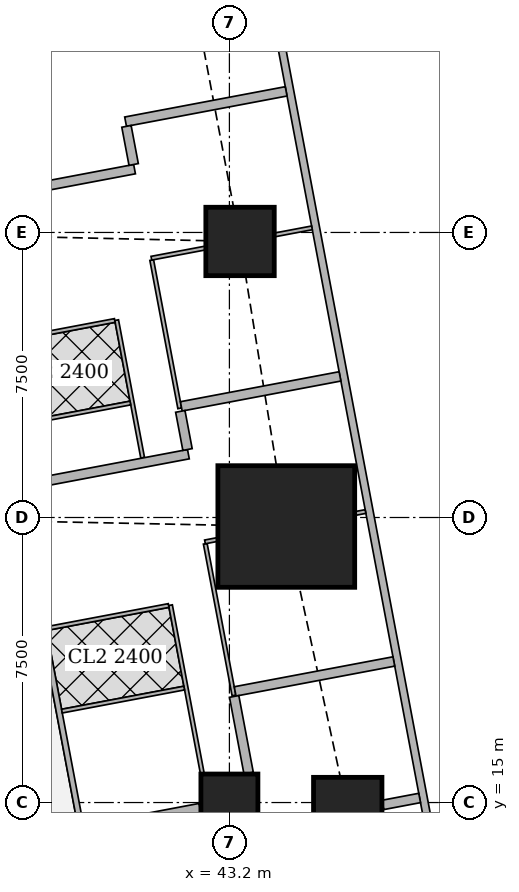
"""IFC4 building model, lengths in metres.
Left out: names, types, materials, properties, quantities, classifications, styles, units other than length and angle.
Written with IfcOpenShell. Run it as: python <this file> out.ifc"""

import sys

from ifc_helpers import new_model, si_unit, direction, frame, frame_2d, origin, origin_2d, place, context, subcontext, project, spatial, rectangle, extrude, element, fill, save


model = new_model("IFC4")
c1 = context("Model", 3, precision=1e-05, world=origin(), true_north=direction((0.0, 1.0)))
c2 = subcontext(c1, "Body", "Model", "MODEL_VIEW")
j1 = project(units=[si_unit("LENGTHUNIT", "METRE"), si_unit("PLANEANGLEUNIT", "RADIAN")], contexts=[c1])
p1 = place(None, origin())
s1 = spatial("IfcSite", under=j1, at=p1, CompositionType="ELEMENT")
p2 = place(p1, origin())
s2 = spatial("IfcBuilding", under=s1, at=p2, CompositionType="ELEMENT")
p3 = place(p2, frame((0.0, 0.0, 169.55)))
s3 = spatial("IfcBuildingStorey", under=s2, at=p3, CompositionType="ELEMENT", Elevation=169.55)
p4 = place(p3, frame((43.2, 15.0, 0.0), z_axis=(0.0, 0.0, 1.0), x_axis=(1.0, 0.0, 0.0)))
e1 = element("IfcColumn", 1, at=p4, inside=s3, PredefinedType="COLUMN", context=c2, shape_type="SweptSolid", body=[
    extrude(rectangle(XDim=1.5, YDim=1.5, at=origin_2d()), origin(), (0.0, 0.0, 1.0), 3.75),
])
p5 = place(p3, frame((46.314, 14.763, 0.0), z_axis=(0.0, 0.0, 1.0), x_axis=(1.0, 0.0, 0.0)))
e2 = element("IfcColumn", 2, at=p5, inside=s3, PredefinedType="COLUMN", context=c2, shape_type="SweptSolid", body=[
    extrude(rectangle(XDim=1.8, YDim=1.8, at=origin_2d()), origin(), (0.0, 0.0, 1.0), 3.75),
])
p6 = place(p3, frame((44.697, 22.263, 0.0), z_axis=(0.0, 0.0, 1.0), x_axis=(1.0, 0.0, 0.0)))
e3 = element("IfcColumn", 3, at=p6, inside=s3, PredefinedType="COLUMN", context=c2, shape_type="SweptSolid", body=[
    extrude(rectangle(XDim=3.6, YDim=3.2, at=origin_2d()), origin(), (0.0, 0.0, 1.0), 3.75),
])
p7 = place(p3, frame((43.48, 29.763, 0.0), z_axis=(0.0, 0.0, 1.0), x_axis=(1.0, 0.0, 0.0)))
e4 = element("IfcColumn", 4, at=p7, inside=s3, PredefinedType="COLUMN", context=c2, shape_type="SweptSolid", body=[
    extrude(rectangle(XDim=1.8, YDim=1.8, at=origin_2d()), origin(), (0.0, 0.0, 1.0), 3.75),
])
p8 = place(p3, frame((50.653, 2.703, 0.0), z_axis=(0.0, 0.0, 1.0), x_axis=(-0.185612026696, 0.982623109613, 0.0)))
e5 = element("IfcWall", 5, at=p8, inside=s3, PredefinedType="SOLIDWALL", context=c2, shape_type="SweptSolid", body=[
    extrude(rectangle(XDim=41.393, YDim=0.2, at=frame_2d((20.697, 0.0))), origin(), (0.0, 0.0, 1.0), 3.5),
])
p9 = place(p8, frame((1.633, 0.0, 0.9)))
e6 = element("IfcOpeningElement", 6, at=p9, cuts=e5, PredefinedType="OPENING", context=c2, shape_type="SweptSolid", body=[
    extrude(rectangle(XDim=1.8, YDim=1.5, at=frame_2d((0.9, 0.75))), frame((0.0, 0.11, 0.0), z_axis=(0.0, -1.0, 0.0), x_axis=(1.0, 0.0, 0.0)), (0.0, 0.0, 1.0), 0.22),
])
p10 = place(p8, frame((6.032, 0.0, 0.9)))
e7 = element("IfcOpeningElement", 7, at=p10, cuts=e5, PredefinedType="OPENING", context=c2, shape_type="SweptSolid", body=[
    extrude(rectangle(XDim=1.8, YDim=1.5, at=frame_2d((0.9, 0.75))), frame((0.0, 0.11, 0.0), z_axis=(0.0, -1.0, 0.0), x_axis=(1.0, 0.0, 0.0)), (0.0, 0.0, 1.0), 0.22),
])
p11 = place(p8, frame((9.848, 0.0, 0.9)))
e8 = element("IfcOpeningElement", 8, at=p11, cuts=e5, PredefinedType="OPENING", context=c2, shape_type="SweptSolid", body=[
    extrude(rectangle(XDim=1.8, YDim=1.5, at=frame_2d((0.9, 0.75))), frame((0.0, 0.11, 0.0), z_axis=(0.0, -1.0, 0.0), x_axis=(1.0, 0.0, 0.0)), (0.0, 0.0, 1.0), 0.22),
])
p12 = place(p8, frame((13.664, 0.0, 0.9)))
e9 = element("IfcOpeningElement", 9, at=p12, cuts=e5, PredefinedType="OPENING", context=c2, shape_type="SweptSolid", body=[
    extrude(rectangle(XDim=1.8, YDim=1.5, at=frame_2d((0.9, 0.75))), frame((0.0, 0.11, 0.0), z_axis=(0.0, -1.0, 0.0), x_axis=(1.0, 0.0, 0.0)), (0.0, 0.0, 1.0), 0.22),
])
p13 = place(p8, frame((17.481, 0.0, 0.9)))
e10 = element("IfcOpeningElement", 10, at=p13, cuts=e5, PredefinedType="OPENING", context=c2, shape_type="SweptSolid", body=[
    extrude(rectangle(XDim=1.8, YDim=1.5, at=frame_2d((0.9, 0.75))), frame((0.0, 0.11, 0.0), z_axis=(0.0, -1.0, 0.0), x_axis=(1.0, 0.0, 0.0)), (0.0, 0.0, 1.0), 0.22),
])
p14 = place(p8, frame((21.297, 0.0, 0.9)))
e11 = element("IfcOpeningElement", 11, at=p14, cuts=e5, PredefinedType="OPENING", context=c2, shape_type="SweptSolid", body=[
    extrude(rectangle(XDim=1.8, YDim=1.5, at=frame_2d((0.9, 0.75))), frame((0.0, 0.11, 0.0), z_axis=(0.0, -1.0, 0.0), x_axis=(1.0, 0.0, 0.0)), (0.0, 0.0, 1.0), 0.22),
])
p15 = place(p8, frame((25.113, 0.0, 0.9)))
e12 = element("IfcOpeningElement", 12, at=p15, cuts=e5, PredefinedType="OPENING", context=c2, shape_type="SweptSolid", body=[
    extrude(rectangle(XDim=1.8, YDim=1.5, at=frame_2d((0.9, 0.75))), frame((0.0, 0.11, 0.0), z_axis=(0.0, -1.0, 0.0), x_axis=(1.0, 0.0, 0.0)), (0.0, 0.0, 1.0), 0.22),
])
p16 = place(p8, frame((28.93, 0.0, 0.9)))
e13 = element("IfcOpeningElement", 13, at=p16, cuts=e5, PredefinedType="OPENING", context=c2, shape_type="SweptSolid", body=[
    extrude(rectangle(XDim=1.8, YDim=1.5, at=frame_2d((0.9, 0.75))), frame((0.0, 0.11, 0.0), z_axis=(0.0, -1.0, 0.0), x_axis=(1.0, 0.0, 0.0)), (0.0, 0.0, 1.0), 0.22),
])
p17 = place(p8, frame((32.746, 0.0, 0.9)))
e14 = element("IfcOpeningElement", 14, at=p17, cuts=e5, PredefinedType="OPENING", context=c2, shape_type="SweptSolid", body=[
    extrude(rectangle(XDim=1.8, YDim=1.5, at=frame_2d((0.9, 0.75))), frame((0.0, 0.11, 0.0), z_axis=(0.0, -1.0, 0.0), x_axis=(1.0, 0.0, 0.0)), (0.0, 0.0, 1.0), 0.22),
])
p18 = place(p8, frame((36.481, 0.0, 0.9)))
e15 = element("IfcOpeningElement", 15, at=p18, cuts=e5, PredefinedType="OPENING", context=c2, shape_type="SweptSolid", body=[
    extrude(rectangle(XDim=1.8, YDim=1.5, at=frame_2d((0.9, 0.75))), frame((0.0, 0.11, 0.0), z_axis=(0.0, -1.0, 0.0), x_axis=(1.0, 0.0, 0.0)), (0.0, 0.0, 1.0), 0.22),
])
p19 = place(p3, frame((33.877, 43.029, 0.0), z_axis=(0.0, 0.0, 1.0), x_axis=(0.185596841028, -0.98262597798, 0.0)))
e16 = element("IfcWall", 16, at=p19, inside=s3, PredefinedType="SOLIDWALL", context=c2, shape_type="SweptSolid", body=[
    extrude(rectangle(XDim=41.66, YDim=0.15, at=frame_2d((20.83, 0.0))), origin(), (0.0, 0.0, 1.0), 2.5),
])
p20 = place(p19, frame((8.63, 0.0, 0.0)))
e17 = element("IfcOpeningElement", 17, at=p20, cuts=e16, PredefinedType="OPENING", context=c2, shape_type="SweptSolid", body=[
    extrude(rectangle(XDim=1.0, YDim=2.1, at=frame_2d((0.5, 1.05))), frame((0.0, 0.085, 0.0), z_axis=(0.0, -1.0, 0.0), x_axis=(1.0, 0.0, 0.0)), (0.0, 0.0, 1.0), 0.17),
])
p21 = place(p19, frame((13.841, 0.0, 0.0)))
e18 = element("IfcOpeningElement", 18, at=p21, cuts=e16, PredefinedType="OPENING", context=c2, shape_type="SweptSolid", body=[
    extrude(rectangle(XDim=1.0, YDim=2.1, at=frame_2d((0.5, 1.05))), frame((0.0, 0.085, 0.0), z_axis=(0.0, -1.0, 0.0), x_axis=(1.0, 0.0, 0.0)), (0.0, 0.0, 1.0), 0.17),
])
p22 = place(p19, frame((21.474, 0.0, 0.0)))
e19 = element("IfcOpeningElement", 19, at=p22, cuts=e16, PredefinedType="OPENING", context=c2, shape_type="SweptSolid", body=[
    extrude(rectangle(XDim=1.0, YDim=2.1, at=frame_2d((0.5, 1.05))), frame((0.0, 0.085, 0.0), z_axis=(0.0, -1.0, 0.0), x_axis=(1.0, 0.0, 0.0)), (0.0, 0.0, 1.0), 0.17),
])
p23 = place(p19, frame((30.4, 0.0, 0.0)))
e20 = element("IfcOpeningElement", 20, at=p23, cuts=e16, PredefinedType="OPENING", context=c2, shape_type="SweptSolid", body=[
    extrude(rectangle(XDim=1.0, YDim=2.1, at=frame_2d((0.5, 1.05))), frame((0.0, 0.085, 0.0), z_axis=(0.0, -1.0, 0.0), x_axis=(1.0, 0.0, 0.0)), (0.0, 0.0, 1.0), 0.17),
])
p24 = place(p19, frame((32.288, 0.0, 0.0)))
e21 = element("IfcOpeningElement", 21, at=p24, cuts=e16, PredefinedType="OPENING", context=c2, shape_type="SweptSolid", body=[
    extrude(rectangle(XDim=1.0, YDim=2.1, at=frame_2d((0.5, 1.05))), frame((0.0, 0.085, 0.0), z_axis=(0.0, -1.0, 0.0), x_axis=(1.0, 0.0, 0.0)), (0.0, 0.0, 1.0), 0.17),
])
p25 = place(p3, frame((41.156, 29.273, 0.0), z_axis=(0.0, 0.0, 1.0), x_axis=(0.185662195158, -0.982613631744, 0.0)))
e22 = element("IfcWall", 22, at=p25, inside=s3, PredefinedType="PARTITIONING", context=c2, shape_type="SweptSolid", body=[
    extrude(rectangle(XDim=3.97, YDim=0.1, at=frame_2d((1.985, 0.0))), origin(), (0.0, 0.0, 1.0), 2.5),
])
p26 = place(p25, frame((1.581, 0.0, 0.0)))
e23 = element("IfcOpeningElement", 23, at=p26, cuts=e22, PredefinedType="OPENING", context=c2, shape_type="SweptSolid", body=[
    extrude(rectangle(XDim=0.9, YDim=2.1, at=frame_2d((0.45, 1.05))), frame((0.0, 0.06, 0.0), z_axis=(0.0, -1.0, 0.0), x_axis=(1.0, 0.0, 0.0)), (0.0, 0.0, 1.0), 0.12),
])
p27 = place(p3, frame((40.233, 27.693, 0.0), z_axis=(0.0, 0.0, 1.0), x_axis=(0.185632361754, -0.982619268216, 0.0)))
e24 = element("IfcWall", 24, at=p27, inside=s3, PredefinedType="PARTITIONING", context=c2, shape_type="SweptSolid", body=[
    extrude(rectangle(XDim=3.685, YDim=0.1, at=frame_2d((1.843, 0.0))), origin(), (0.0, 0.0, 1.0), 3.5),
])
p28 = place(p27, frame((0.655, 0.0, 0.0)))
e25 = element("IfcOpeningElement", 25, at=p28, cuts=e24, PredefinedType="OPENING", context=c2, shape_type="SweptSolid", body=[
    extrude(rectangle(XDim=0.9, YDim=2.1, at=frame_2d((0.45, 1.05))), frame((0.0, 0.06, 0.0), z_axis=(0.0, -1.0, 0.0), x_axis=(1.0, 0.0, 0.0)), (0.0, 0.0, 1.0), 0.12),
])
p29 = place(p27, frame((2.563, 0.0, 0.0)))
e26 = element("IfcOpeningElement", 26, at=p29, cuts=e24, PredefinedType="OPENING", context=c2, shape_type="SweptSolid", body=[
    extrude(rectangle(XDim=0.9, YDim=2.1, at=frame_2d((0.45, 1.05))), frame((0.0, 0.06, 0.0), z_axis=(0.0, -1.0, 0.0), x_axis=(1.0, 0.0, 0.0)), (0.0, 0.0, 1.0), 0.12),
])
p30 = place(p3, frame((45.372, 30.121, 0.0), z_axis=(0.0, 0.0, 1.0), x_axis=(-0.982530437059, -0.186101961978, 0.0)))
e27 = element("IfcWall", 27, at=p30, inside=s3, PredefinedType="PARTITIONING", context=c2, shape_type="SweptSolid", body=[
    extrude(rectangle(XDim=1.0, YDim=0.1, at=frame_2d((0.5, 0.0))), origin(), (0.0, 0.0, 1.0), 3.5),
])
p31 = place(p3, frame((42.57, 29.591, 0.0), z_axis=(0.0, 0.0, 1.0), x_axis=(-0.98259436979, -0.185764109712, 0.0)))
e28 = element("IfcWall", 28, at=p31, inside=s3, PredefinedType="PARTITIONING", context=c2, shape_type="SweptSolid", body=[
    extrude(rectangle(XDim=1.448, YDim=0.1, at=frame_2d((0.724, 0.0))), origin(), (0.0, 0.0, 1.0), 2.5),
])
for number, where, z_axis, x_axis in (
    (29, (40.184, 27.684, 0.0), (0.0, 0.0, 1.0), (-0.983, -0.186, 0.0)),
    (30, (40.594, 25.512, 0.0), (0.0, 0.0, 1.0), (-0.983, -0.186, 0.0)),
):
    element("IfcWall", number, at=place(p3, frame(where, z_axis=z_axis, x_axis=x_axis)), inside=s3, PredefinedType="PARTITIONING", context=c2, shape_type="SweptSolid", body=[
        extrude(rectangle(XDim=3.274, YDim=0.1, at=frame_2d((1.637, 0.0))), origin(), (0.0, 0.0, 1.0), 3.5),
    ])
p32 = place(p3, frame((44.693, 33.713, 0.0), z_axis=(0.0, 0.0, 1.0), x_axis=(-0.982633535512, -0.185556823879, 0.0)))
e31 = element("IfcWall", 31, at=p32, inside=s3, PredefinedType="SOLIDWALL", context=c2, shape_type="SweptSolid", body=[
    extrude(rectangle(XDim=4.3, YDim=0.25, at=frame_2d((2.15, 0.0))), origin(), (0.0, 0.0, 1.0), 2.1),
])
p33 = place(p3, frame((40.704, 31.666, 0.0), z_axis=(0.0, 0.0, 1.0), x_axis=(-0.982612837616, -0.185666398014, 0.0)))
e32 = element("IfcWall", 32, at=p33, inside=s3, PredefinedType="SOLIDWALL", context=c2, shape_type="SweptSolid", body=[
    extrude(rectangle(XDim=4.525, YDim=0.25, at=frame_2d((2.262, 0.0))), origin(), (0.0, 0.0, 1.0), 3.5),
])
p34 = place(p3, frame((40.491, 32.792, 0.0), z_axis=(0.0, 0.0, 1.0), x_axis=(0.18607888991, -0.982534806879, 0.0)))
e33 = element("IfcWall", 33, at=p34, inside=s3, PredefinedType="SOLIDWALL", context=c2, shape_type="SweptSolid", body=[
    extrude(rectangle(XDim=1.021, YDim=0.25, at=frame_2d((0.51, 0.0))), origin(), (0.0, 0.0, 1.0), 3.5),
])
p35 = place(p3, frame((42.565, 21.809, 0.0), z_axis=(0.0, 0.0, 1.0), x_axis=(0.185910488551, -0.982566684885, 0.0)))
e34 = element("IfcWall", 34, at=p35, inside=s3, PredefinedType="PARTITIONING", context=c2, shape_type="SweptSolid", body=[
    extrude(rectangle(XDim=4.062, YDim=0.1, at=frame_2d((2.031, 0.0))), origin(), (0.0, 0.0, 1.0), 2.5),
])
p36 = place(p35, frame((1.618, 0.0, 0.0)))
e35 = element("IfcOpeningElement", 35, at=p36, cuts=e34, PredefinedType="OPENING", context=c2, shape_type="SweptSolid", body=[
    extrude(rectangle(XDim=0.9, YDim=2.1, at=frame_2d((0.45, 1.05))), frame((0.0, 0.06, 0.0), z_axis=(0.0, -1.0, 0.0), x_axis=(1.0, 0.0, 0.0)), (0.0, 0.0, 1.0), 0.12),
])
p37 = place(p3, frame((41.65, 20.193, 0.0), z_axis=(0.0, 0.0, 1.0), x_axis=(0.185692658583, -0.982607875273, 0.0)))
e36 = element("IfcWall", 36, at=p37, inside=s3, PredefinedType="PARTITIONING", context=c2, shape_type="SweptSolid", body=[
    extrude(rectangle(XDim=4.514, YDim=0.1, at=frame_2d((2.257, 0.0))), origin(), (0.0, 0.0, 1.0), 3.5),
])
p38 = place(p37, frame((0.655, 0.0, 0.0)))
e37 = element("IfcOpeningElement", 37, at=p38, cuts=e36, PredefinedType="OPENING", context=c2, shape_type="SweptSolid", body=[
    extrude(rectangle(XDim=0.9, YDim=2.1, at=frame_2d((0.45, 1.05))), frame((0.0, 0.06, 0.0), z_axis=(0.0, -1.0, 0.0), x_axis=(1.0, 0.0, 0.0)), (0.0, 0.0, 1.0), 0.12),
])
p39 = place(p37, frame((3.35, 0.0, 0.0)))
e38 = element("IfcOpeningElement", 38, at=p39, cuts=e36, PredefinedType="OPENING", context=c2, shape_type="SweptSolid", body=[
    extrude(rectangle(XDim=0.9, YDim=2.1, at=frame_2d((0.45, 1.05))), frame((0.0, 0.06, 0.0), z_axis=(0.0, -1.0, 0.0), x_axis=(1.0, 0.0, 0.0)), (0.0, 0.0, 1.0), 0.12),
])
p40 = place(p3, frame((46.782, 22.657, 0.0), z_axis=(0.0, 0.0, 1.0), x_axis=(-0.982574553168, -0.185868898601, 0.0)))
e39 = element("IfcWall", 39, at=p40, inside=s3, PredefinedType="PARTITIONING", context=c2, shape_type="SweptSolid", body=[
    extrude(rectangle(XDim=0.28, YDim=0.1, at=frame_2d((0.14, 0.0))), origin(), (0.0, 0.0, 1.0), 3.5),
])
p41 = place(p3, frame((42.887, 21.921, 0.0), z_axis=(0.0, 0.0, 1.0), x_axis=(-0.982274918032, -0.187445953293, 0.0)))
e40 = element("IfcWall", 40, at=p41, inside=s3, PredefinedType="PARTITIONING", context=c2, shape_type="SweptSolid", body=[
    extrude(rectangle(XDim=0.336, YDim=0.1, at=frame_2d((0.168, 0.0))), origin(), (0.0, 0.0, 1.0), 2.5),
])
p42 = place(p3, frame((41.601, 20.184, 0.0), z_axis=(0.0, 0.0, 1.0), x_axis=(-0.982607026909, -0.185697147715, 0.0)))
e41 = element("IfcWall", 41, at=p42, inside=s3, PredefinedType="PARTITIONING", context=c2, shape_type="SweptSolid", body=[
    extrude(rectangle(XDim=3.275, YDim=0.1, at=frame_2d((1.637, 0.0))), origin(), (0.0, 0.0, 1.0), 3.5),
])
p43 = place(p3, frame((42.011, 18.012, 0.0), z_axis=(0.0, 0.0, 1.0), x_axis=(-0.982674977865, -0.185337227447, 0.0)))
e42 = element("IfcWall", 42, at=p43, inside=s3, PredefinedType="PARTITIONING", context=c2, shape_type="SweptSolid", body=[
    extrude(rectangle(XDim=3.275, YDim=0.1, at=frame_2d((1.637, 0.0))), origin(), (0.0, 0.0, 1.0), 3.5),
])
p44 = place(p3, frame((46.11, 26.213, 0.0), z_axis=(0.0, 0.0, 1.0), x_axis=(-0.982623519589, -0.185609856287, 0.0)))
e43 = element("IfcWall", 43, at=p44, inside=s3, PredefinedType="SOLIDWALL", context=c2, shape_type="SweptSolid", body=[
    extrude(rectangle(XDim=4.25, YDim=0.25, at=frame_2d((2.125, 0.0))), origin(), (0.0, 0.0, 1.0), 2.1),
])
p45 = place(p3, frame((42.121, 24.166, 0.0), z_axis=(0.0, 0.0, 1.0), x_axis=(-0.982612837616, -0.185666398014, 0.0)))
e44 = element("IfcWall", 44, at=p45, inside=s3, PredefinedType="SOLIDWALL", context=c2, shape_type="SweptSolid", body=[
    extrude(rectangle(XDim=4.525, YDim=0.25, at=frame_2d((2.262, 0.0))), origin(), (0.0, 0.0, 1.0), 3.5),
])
p46 = place(p3, frame((41.908, 25.292, 0.0), z_axis=(0.0, 0.0, 1.0), x_axis=(0.18607888991, -0.982534806879, 0.0)))
e45 = element("IfcWall", 45, at=p46, inside=s3, PredefinedType="SOLIDWALL", context=c2, shape_type="SweptSolid", body=[
    extrude(rectangle(XDim=1.021, YDim=0.25, at=frame_2d((0.51, 0.0))), origin(), (0.0, 0.0, 1.0), 3.5),
])
p47 = place(p3, frame((47.527, 18.712, 0.0), z_axis=(0.0, 0.0, 1.0), x_axis=(-0.982665405803, -0.185387972203, 0.0)))
e46 = element("IfcWall", 46, at=p47, inside=s3, PredefinedType="SOLIDWALL", context=c2, shape_type="SweptSolid", body=[
    extrude(rectangle(XDim=4.25, YDim=0.25, at=frame_2d((2.125, 0.0))), origin(), (0.0, 0.0, 1.0), 2.1),
])
p48 = place(p3, frame((42.426, 14.854, 0.0), z_axis=(0.0, 0.0, 1.0), x_axis=(-0.982603320446, -0.185716759201, 0.0)))
e47 = element("IfcWall", 47, at=p48, inside=s3, PredefinedType="SOLIDWALL", context=c2, shape_type="SweptSolid", body=[
    extrude(rectangle(XDim=3.096, YDim=0.25, at=frame_2d((1.548, 0.0))), origin(), (0.0, 0.0, 1.0), 3.5),
])
p49 = place(p3, frame((43.325, 17.792, 0.0), z_axis=(0.0, 0.0, 1.0), x_axis=(0.185565963553, -0.982631809566, 0.0)))
e48 = element("IfcWall", 48, at=p49, inside=s3, PredefinedType="SOLIDWALL", context=c2, shape_type="SweptSolid", body=[
    extrude(rectangle(XDim=2.054, YDim=0.25, at=frame_2d((1.027, 0.0))), origin(), (0.0, 0.0, 1.0), 3.5),
])
p50 = place(p3, frame((48.206, 15.12, 0.0), z_axis=(0.0, 0.0, 1.0), x_axis=(-0.982576361834, -0.185859337043, 0.0)))
e49 = element("IfcWall", 49, at=p50, inside=s3, PredefinedType="SOLIDWALL", context=c2, shape_type="SweptSolid", body=[
    extrude(rectangle(XDim=0.985, YDim=0.25, at=frame_2d((0.493, 0.0))), origin(), (0.0, 0.0, 1.0), 2.1),
])
p51 = place(p12, origin())
e50 = element("IfcWindow", 50, at=p51, inside=s3, PartitioningType="SINGLE_PANEL", PredefinedType="WINDOW", context=c2, shape_type="SweptSolid", body=[
    extrude(rectangle(XDim=1.8, YDim=1.5, at=frame_2d((0.9, 0.75))), frame((0.0, 0.03, 0.0), z_axis=(0.0, -1.0, 0.0), x_axis=(1.0, 0.0, 0.0)), (0.0, 0.0, 1.0), 0.06),
])
fill(e9, e50)
p52 = place(p13, origin())
e51 = element("IfcWindow", 51, at=p52, inside=s3, PartitioningType="SINGLE_PANEL", PredefinedType="WINDOW", context=c2, shape_type="SweptSolid", body=[
    extrude(rectangle(XDim=1.8, YDim=1.5, at=frame_2d((0.9, 0.75))), frame((0.0, 0.03, 0.0), z_axis=(0.0, -1.0, 0.0), x_axis=(1.0, 0.0, 0.0)), (0.0, 0.0, 1.0), 0.06),
])
fill(e10, e51)
p53 = place(p14, origin())
e52 = element("IfcWindow", 52, at=p53, inside=s3, PartitioningType="SINGLE_PANEL", PredefinedType="WINDOW", context=c2, shape_type="SweptSolid", body=[
    extrude(rectangle(XDim=1.8, YDim=1.5, at=frame_2d((0.9, 0.75))), frame((0.0, 0.03, 0.0), z_axis=(0.0, -1.0, 0.0), x_axis=(1.0, 0.0, 0.0)), (0.0, 0.0, 1.0), 0.06),
])
fill(e11, e52)
p54 = place(p15, origin())
e53 = element("IfcWindow", 53, at=p54, inside=s3, PartitioningType="SINGLE_PANEL", PredefinedType="WINDOW", context=c2, shape_type="SweptSolid", body=[
    extrude(rectangle(XDim=1.8, YDim=1.5, at=frame_2d((0.9, 0.75))), frame((0.0, 0.03, 0.0), z_axis=(0.0, -1.0, 0.0), x_axis=(1.0, 0.0, 0.0)), (0.0, 0.0, 1.0), 0.06),
])
fill(e12, e53)
p55 = place(p16, origin())
e54 = element("IfcWindow", 54, at=p55, inside=s3, PartitioningType="SINGLE_PANEL", PredefinedType="WINDOW", context=c2, shape_type="SweptSolid", body=[
    extrude(rectangle(XDim=1.8, YDim=1.5, at=frame_2d((0.9, 0.75))), frame((0.0, 0.03, 0.0), z_axis=(0.0, -1.0, 0.0), x_axis=(1.0, 0.0, 0.0)), (0.0, 0.0, 1.0), 0.06),
])
fill(e13, e54)
p56 = place(p26, origin())
e55 = element("IfcDoor", 55, at=p56, inside=s3, OperationType="SINGLE_SWING_RIGHT", PredefinedType="DOOR", context=c2, shape_type="SweptSolid", body=[
    extrude(rectangle(XDim=0.9, YDim=2.1, at=frame_2d((0.45, 1.05))), frame((0.0, 0.025, 0.0), z_axis=(0.0, -1.0, 0.0), x_axis=(1.0, 0.0, 0.0)), (0.0, 0.0, 1.0), 0.05),
])
fill(e23, e55)
p57 = place(p28, origin())
e56 = element("IfcDoor", 56, at=p57, inside=s3, OperationType="SINGLE_SWING_RIGHT", PredefinedType="DOOR", context=c2, shape_type="SweptSolid", body=[
    extrude(rectangle(XDim=0.9, YDim=2.1, at=frame_2d((0.45, 1.05))), frame((0.0, 0.025, 0.0), z_axis=(0.0, -1.0, 0.0), x_axis=(1.0, 0.0, 0.0)), (0.0, 0.0, 1.0), 0.05),
])
fill(e25, e56)
p58 = place(p29, origin())
e57 = element("IfcDoor", 57, at=p58, inside=s3, OperationType="SINGLE_SWING_LEFT", PredefinedType="DOOR", context=c2, shape_type="SweptSolid", body=[
    extrude(rectangle(XDim=0.9, YDim=2.1, at=frame_2d((0.45, 1.05))), frame((0.0, 0.025, 0.0), z_axis=(0.0, -1.0, 0.0), x_axis=(1.0, 0.0, 0.0)), (0.0, 0.0, 1.0), 0.05),
])
fill(e26, e57)
p59 = place(p36, origin())
e58 = element("IfcDoor", 58, at=p59, inside=s3, OperationType="SINGLE_SWING_RIGHT", PredefinedType="DOOR", context=c2, shape_type="SweptSolid", body=[
    extrude(rectangle(XDim=0.9, YDim=2.1, at=frame_2d((0.45, 1.05))), frame((0.0, 0.025, 0.0), z_axis=(0.0, -1.0, 0.0), x_axis=(1.0, 0.0, 0.0)), (0.0, 0.0, 1.0), 0.05),
])
fill(e35, e58)
p60 = place(p38, origin())
e59 = element("IfcDoor", 59, at=p60, inside=s3, OperationType="SINGLE_SWING_RIGHT", PredefinedType="DOOR", context=c2, shape_type="SweptSolid", body=[
    extrude(rectangle(XDim=0.9, YDim=2.1, at=frame_2d((0.45, 1.05))), frame((0.0, 0.025, 0.0), z_axis=(0.0, -1.0, 0.0), x_axis=(1.0, 0.0, 0.0)), (0.0, 0.0, 1.0), 0.05),
])
fill(e37, e59)
p61 = place(p39, origin())
e60 = element("IfcDoor", 60, at=p61, inside=s3, OperationType="SINGLE_SWING_LEFT", PredefinedType="DOOR", context=c2, shape_type="SweptSolid", body=[
    extrude(rectangle(XDim=0.9, YDim=2.1, at=frame_2d((0.45, 1.05))), frame((0.0, 0.025, 0.0), z_axis=(0.0, -1.0, 0.0), x_axis=(1.0, 0.0, 0.0)), (0.0, 0.0, 1.0), 0.05),
])
fill(e38, e60)
save(model, sys.argv[1])
